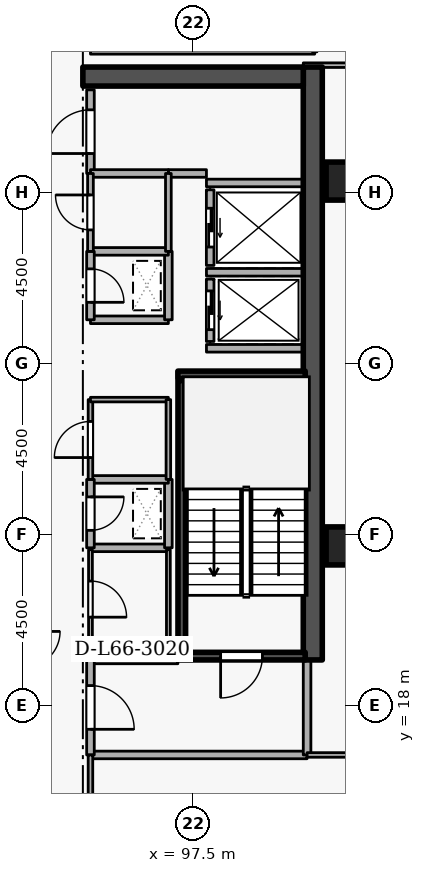
"""IFC4 building model, lengths in metres.
Left out: names, types, materials, properties, quantities, classifications, styles, units other than length and angle.
Written with IfcOpenShell. Run it as: python <this file> out.ifc"""

import sys

from ifc_helpers import new_model, si_unit, direction, frame, frame_2d, origin, origin_2d, place, context, subcontext, project, spatial, rectangle, extrude, element, fill, save


model = new_model("IFC4")
c1 = context("Model", 3, precision=1e-05, world=origin(), true_north=direction((0.0, 1.0)))
c2 = subcontext(c1, "Body", "Model", "MODEL_VIEW")
j1 = project(units=[si_unit("LENGTHUNIT", "METRE"), si_unit("PLANEANGLEUNIT", "RADIAN")], contexts=[c1])
p1 = place(None, origin())
s1 = spatial("IfcSite", under=j1, at=p1, CompositionType="ELEMENT")
p2 = place(p1, origin())
s2 = spatial("IfcBuilding", under=s1, at=p2, CompositionType="ELEMENT")
p3 = place(p2, frame((0.0, 0.0, 247.5)))
s3 = spatial("IfcBuildingStorey", under=s2, at=p3, CompositionType="ELEMENT", Elevation=247.5)
p4 = place(p3, frame((100.65, 19.2, 0.0), z_axis=(0.0, 0.0, 1.0), x_axis=(0.0, 1.0, 0.0)))
e1 = element("IfcWall", 1, at=p4, inside=s3, PredefinedType="SHEAR", context=c2, shape_type="SweptSolid", body=[
    extrude(rectangle(XDim=15.6, YDim=0.5, at=frame_2d((7.8, 0.0))), origin(), (0.0, 0.0, 1.0), 3.6),
])
p5 = place(p3, frame((94.6, 34.55, 0.0), z_axis=(0.0, 0.0, 1.0), x_axis=(1.0, 0.0, 0.0)))
e2 = element("IfcWall", 2, at=p5, inside=s3, PredefinedType="SHEAR", context=c2, shape_type="SweptSolid", body=[
    extrude(rectangle(XDim=5.8, YDim=0.5, at=frame_2d((2.9, 0.0))), origin(), (0.0, 0.0, 1.0), 3.6),
])
for number, where, z_axis, x_axis in (
    (3, (101.5, 22.2, 0.0), (0.0, 0.0, 1.0), (1.0, 0.0, 0.0)),
    (4, (101.5, 31.8, 0.0), (0.0, 0.0, 1.0), (1.0, 0.0, 0.0)),
):
    element("IfcColumn", number, at=place(p3, frame(where, z_axis=z_axis, x_axis=x_axis)), inside=s3, PredefinedType="COLUMN", context=c2, shape_type="SweptSolid", body=[
        extrude(rectangle(XDim=1.0, YDim=1.0, at=origin_2d()), origin(), (0.0, 0.0, 1.0), 3.6),
    ])
p6 = place(p3, frame((97.95, 29.22, 0.0), z_axis=(0.0, 0.0, 1.0), x_axis=(0.0, -1.0, 0.0)))
e5 = element("IfcWall", 5, at=p6, inside=s3, PredefinedType="STANDARD", context=c2, shape_type="SweptSolid", body=[
    extrude(rectangle(XDim=1.64, YDim=0.2, at=frame_2d((0.82, 0.0))), origin(), (0.0, 0.0, 1.0), 3.34),
])
p7 = place(p6, frame((0.31, 0.0, 0.0)))
e6 = element("IfcOpeningElement", 6, at=p7, cuts=e5, PredefinedType="OPENING", context=c2, shape_type="SweptSolid", body=[
    extrude(rectangle(XDim=1.02, YDim=2.06, at=frame_2d((0.51, 1.03))), frame((0.0, 0.11, 0.0), z_axis=(0.0, -1.0, 0.0), x_axis=(1.0, 0.0, 0.0)), (0.0, 0.0, 1.0), 0.22),
])
p8 = place(p3, frame((97.95, 31.57, 0.0), z_axis=(0.0, 0.0, 1.0), x_axis=(0.0, -1.0, 0.0)))
e7 = element("IfcWall", 7, at=p8, inside=s3, PredefinedType="STANDARD", context=c2, shape_type="SweptSolid", body=[
    extrude(rectangle(XDim=1.99, YDim=0.2, at=frame_2d((0.995, 0.0))), origin(), (0.0, 0.0, 1.0), 3.34),
])
p9 = place(p8, frame((0.485, 0.0, 0.0)))
e8 = element("IfcOpeningElement", 8, at=p9, cuts=e7, PredefinedType="OPENING", context=c2, shape_type="SweptSolid", body=[
    extrude(rectangle(XDim=1.02, YDim=2.06, at=frame_2d((0.51, 1.03))), frame((0.0, 0.11, 0.0), z_axis=(0.0, -1.0, 0.0), x_axis=(1.0, 0.0, 0.0)), (0.0, 0.0, 1.0), 0.22),
])
for number, where, z_axis, x_axis in (
    (9, (97.852, 29.4, 0.0), (0.0, 0.0, 1.0), (1.0, 0.0, 0.0)),
    (10, (97.852, 27.4, 0.0), (0.0, 0.0, 1.0), (1.0, 0.0, 0.0)),
    (11, (97.852, 31.75, 0.0), (0.0, 0.0, 1.0), (1.0, 0.0, 0.0)),
):
    element("IfcWall", number, at=place(p3, frame(where, z_axis=z_axis, x_axis=x_axis)), inside=s3, PredefinedType="STANDARD", context=c2, shape_type="SweptSolid", body=[
        extrude(rectangle(XDim=2.536, YDim=0.2, at=frame_2d((1.268, 0.0))), origin(), (0.0, 0.0, 1.0), 3.34),
    ])
p10 = place(p3, frame((100.45, 19.3, 0.0), z_axis=(0.0, 0.0, 1.0), x_axis=(-1.0, 0.0, 0.0)))
e12 = element("IfcWall", 12, at=p10, inside=s3, PredefinedType="SHEAR", context=c2, shape_type="SweptSolid", body=[
    extrude(rectangle(XDim=3.35, YDim=0.2, at=frame_2d((1.675, 0.0))), origin(), (0.0, 0.0, 1.0), 3.6),
])
p11 = place(p10, frame((1.125, 0.0, 0.0)))
e13 = element("IfcOpeningElement", 13, at=p11, cuts=e12, PredefinedType="OPENING", context=c2, shape_type="SweptSolid", body=[
    extrude(rectangle(XDim=1.1, YDim=2.1, at=frame_2d((0.55, 1.05))), frame((0.0, 0.11, 0.0), z_axis=(0.0, -1.0, 0.0), x_axis=(1.0, 0.0, 0.0)), (0.0, 0.0, 1.0), 0.22),
])
p12 = place(p3, frame((97.1, 26.7, 0.0), z_axis=(0.0, 0.0, 1.0), x_axis=(1.0, 0.0, 0.0)))
e14 = element("IfcWall", 14, at=p12, inside=s3, PredefinedType="SHEAR", context=c2, shape_type="SweptSolid", body=[
    extrude(rectangle(XDim=3.35, YDim=0.2, at=frame_2d((1.675, 0.0))), origin(), (0.0, 0.0, 1.0), 3.6),
])
p13 = place(p3, frame((97.203, 26.55, 0.0), z_axis=(0.0, 0.0, 1.0), x_axis=(0.0, -1.0, 0.0)))
e15 = element("IfcWall", 15, at=p13, inside=s3, PredefinedType="SHEAR", context=c2, shape_type="SweptSolid", body=[
    extrude(rectangle(XDim=7.1, YDim=0.2, at=frame_2d((3.55, 0.0))), origin(), (0.0, 0.0, 1.0), 3.6),
])
p14 = place(p3, frame((94.8, 16.7, 0.0), z_axis=(0.0, 0.0, 1.0), x_axis=(1.0, 0.0, 0.0)))
e16 = element("IfcWall", 16, at=p14, inside=s3, PredefinedType="STANDARD", context=c2, shape_type="SweptSolid", body=[
    extrude(rectangle(XDim=5.7, YDim=0.2, at=frame_2d((2.85, 0.0))), origin(), (0.0, 0.0, 1.0), 3.34),
])
p15 = place(p3, frame((100.5, 16.7, 0.0), z_axis=(0.0, 0.0, 1.0), x_axis=(0.0, 1.0, 0.0)))
e17 = element("IfcWall", 17, at=p15, inside=s3, PredefinedType="STANDARD", context=c2, shape_type="SweptSolid", body=[
    extrude(rectangle(XDim=2.5, YDim=0.2, at=frame_2d((1.25, 0.0))), origin(), (0.0, 0.0, 1.0), 3.34),
])
p16 = place(p3, frame((97.1, 19.2, 0.0), z_axis=(0.0, 0.0, 1.0), x_axis=(-1.0, 0.0, 0.0)))
e18 = element("IfcWall", 18, at=p16, inside=s3, PredefinedType="STANDARD", context=c2, shape_type="SweptSolid", body=[
    extrude(rectangle(XDim=2.3, YDim=0.2, at=frame_2d((1.15, 0.0))), origin(), (0.0, 0.0, 1.0), 2.545),
])
p17 = place(p3, frame((94.8, 19.2, 0.0), z_axis=(0.0, 0.0, 1.0), x_axis=(0.0, -1.0, 0.0)))
e19 = element("IfcWall", 19, at=p17, inside=s3, PredefinedType="STANDARD", context=c2, shape_type="SweptSolid", body=[
    extrude(rectangle(XDim=2.5, YDim=0.2, at=frame_2d((1.25, 0.0))), origin(), (0.0, 0.0, 1.0), 3.34),
])
p18 = place(p17, frame((0.675, 0.0, 0.0)))
e20 = element("IfcOpeningElement", 20, at=p18, cuts=e19, PredefinedType="OPENING", context=c2, shape_type="SweptSolid", body=[
    extrude(rectangle(XDim=1.15, YDim=2.1, at=frame_2d((0.575, 1.05))), frame((0.0, 0.11, 0.0), z_axis=(0.0, -1.0, 0.0), x_axis=(1.0, 0.0, 0.0)), (0.0, 0.0, 1.0), 0.22),
])
p19 = place(p3, frame((94.8, 28.15, 0.0), z_axis=(0.0, 0.0, 1.0), x_axis=(1.0, 0.0, 0.0)))
e21 = element("IfcWall", 21, at=p19, inside=s3, PredefinedType="STANDARD", context=c2, shape_type="SweptSolid", body=[
    extrude(rectangle(XDim=2.05, YDim=0.2, at=frame_2d((1.025, 0.0))), origin(), (0.0, 0.0, 1.0), 3.34),
])
p20 = place(p3, frame((96.85, 28.15, 0.0), z_axis=(0.0, 0.0, 1.0), x_axis=(0.0, 1.0, 0.0)))
e22 = element("IfcWall", 22, at=p20, inside=s3, PredefinedType="STANDARD", context=c2, shape_type="SweptSolid", body=[
    extrude(rectangle(XDim=1.8, YDim=0.2, at=frame_2d((0.9, 0.0))), origin(), (0.0, 0.0, 1.0), 3.34),
])
p21 = place(p3, frame((96.85, 29.95, 0.0), z_axis=(0.0, 0.0, 1.0), x_axis=(-1.0, 0.0, 0.0)))
e23 = element("IfcWall", 23, at=p21, inside=s3, PredefinedType="STANDARD", context=c2, shape_type="SweptSolid", body=[
    extrude(rectangle(XDim=2.05, YDim=0.2, at=frame_2d((1.025, 0.0))), origin(), (0.0, 0.0, 1.0), 3.34),
])
p22 = place(p3, frame((94.8, 29.95, 0.0), z_axis=(0.0, 0.0, 1.0), x_axis=(0.0, -1.0, 0.0)))
e24 = element("IfcWall", 24, at=p22, inside=s3, PredefinedType="STANDARD", context=c2, shape_type="SweptSolid", body=[
    extrude(rectangle(XDim=1.8, YDim=0.2, at=frame_2d((0.9, 0.0))), origin(), (0.0, 0.0, 1.0), 3.34),
])
p23 = place(p22, frame((0.46, 0.0, 0.0)))
e25 = element("IfcOpeningElement", 25, at=p23, cuts=e24, PredefinedType="OPENING", context=c2, shape_type="SweptSolid", body=[
    extrude(rectangle(XDim=0.88, YDim=2.04, at=frame_2d((0.44, 1.02))), frame((0.0, 0.11, 0.0), z_axis=(0.0, -1.0, 0.0), x_axis=(1.0, 0.0, 0.0)), (0.0, 0.0, 1.0), 0.22),
])
p24 = place(p3, frame((94.8, 22.15, 0.0), z_axis=(0.0, 0.0, 1.0), x_axis=(1.0, 0.0, 0.0)))
e26 = element("IfcWall", 26, at=p24, inside=s3, PredefinedType="STANDARD", context=c2, shape_type="SweptSolid", body=[
    extrude(rectangle(XDim=2.05, YDim=0.2, at=frame_2d((1.025, 0.0))), origin(), (0.0, 0.0, 1.0), 3.34),
])
p25 = place(p3, frame((96.85, 22.15, 0.0), z_axis=(0.0, 0.0, 1.0), x_axis=(0.0, 1.0, 0.0)))
e27 = element("IfcWall", 27, at=p25, inside=s3, PredefinedType="STANDARD", context=c2, shape_type="SweptSolid", body=[
    extrude(rectangle(XDim=1.8, YDim=0.2, at=frame_2d((0.9, 0.0))), origin(), (0.0, 0.0, 1.0), 3.34),
])
p26 = place(p3, frame((96.85, 23.95, 0.0), z_axis=(0.0, 0.0, 1.0), x_axis=(-1.0, 0.0, 0.0)))
e28 = element("IfcWall", 28, at=p26, inside=s3, PredefinedType="STANDARD", context=c2, shape_type="SweptSolid", body=[
    extrude(rectangle(XDim=2.05, YDim=0.2, at=frame_2d((1.025, 0.0))), origin(), (0.0, 0.0, 1.0), 3.34),
])
p27 = place(p3, frame((94.8, 23.95, 0.0), z_axis=(0.0, 0.0, 1.0), x_axis=(0.0, -1.0, 0.0)))
e29 = element("IfcWall", 29, at=p27, inside=s3, PredefinedType="STANDARD", context=c2, shape_type="SweptSolid", body=[
    extrude(rectangle(XDim=1.8, YDim=0.2, at=frame_2d((0.9, 0.0))), origin(), (0.0, 0.0, 1.0), 3.34),
])
p28 = place(p27, frame((0.46, 0.0, 0.0)))
e30 = element("IfcOpeningElement", 30, at=p28, cuts=e29, PredefinedType="OPENING", context=c2, shape_type="SweptSolid", body=[
    extrude(rectangle(XDim=0.88, YDim=2.04, at=frame_2d((0.44, 1.02))), frame((0.0, 0.11, 0.0), z_axis=(0.0, -1.0, 0.0), x_axis=(1.0, 0.0, 0.0)), (0.0, 0.0, 1.0), 0.22),
])
p29 = place(p3, frame((94.8, 32.0, 0.0), z_axis=(0.0, 0.0, 1.0), x_axis=(0.0, 1.0, 0.0)))
e31 = element("IfcWall", 31, at=p29, inside=s3, PredefinedType="STANDARD", context=c2, shape_type="SweptSolid", body=[
    extrude(rectangle(XDim=2.2, YDim=0.2, at=frame_2d((1.1, 0.0))), origin(), (0.0, 0.0, 1.0), 3.34),
])
p30 = place(p29, frame((0.525, 0.0, 0.0)))
e32 = element("IfcOpeningElement", 32, at=p30, cuts=e31, PredefinedType="OPENING", context=c2, shape_type="SweptSolid", body=[
    extrude(rectangle(XDim=1.15, YDim=2.1, at=frame_2d((0.575, 1.05))), frame((0.0, 0.11, 0.0), z_axis=(0.0, -1.0, 0.0), x_axis=(1.0, 0.0, 0.0)), (0.0, 0.0, 1.0), 0.22),
])
p31 = place(p3, frame((97.852, 32.0, 0.0), z_axis=(0.0, 0.0, 1.0), x_axis=(-1.0, 0.0, 0.0)))
e33 = element("IfcWall", 33, at=p31, inside=s3, PredefinedType="STANDARD", context=c2, shape_type="SweptSolid", body=[
    extrude(rectangle(XDim=1.002, YDim=0.2, at=frame_2d((0.501, 0.0))), origin(), (0.0, 0.0, 1.0), 3.34),
])
p32 = place(p3, frame((96.85, 32.0, 0.0), z_axis=(0.0, 0.0, 1.0), x_axis=(-1.0, 0.0, 0.0)))
e34 = element("IfcWall", 34, at=p32, inside=s3, PredefinedType="STANDARD", context=c2, shape_type="SweptSolid", body=[
    extrude(rectangle(XDim=2.05, YDim=0.2, at=frame_2d((1.025, 0.0))), origin(), (0.0, 0.0, 1.0), 3.34),
])
p33 = place(p3, frame((94.8, 19.5, 0.0), z_axis=(0.0, 0.0, 1.0), x_axis=(1.0, 0.0, 0.0)))
e35 = element("IfcWall", 35, at=p33, inside=s3, PredefinedType="PARTITIONING", context=c2, shape_type="SweptSolid", body=[
    extrude(rectangle(XDim=2.05, YDim=0.1, at=frame_2d((1.025, 0.0))), origin(), (0.0, 0.0, 1.0), 2.545),
])
p34 = place(p3, frame((96.85, 19.5, 0.0), z_axis=(0.0, 0.0, 1.0), x_axis=(0.0, 1.0, 0.0)))
e36 = element("IfcWall", 36, at=p34, inside=s3, PredefinedType="PARTITIONING", context=c2, shape_type="SweptSolid", body=[
    extrude(rectangle(XDim=2.6, YDim=0.1, at=frame_2d((1.3, 0.0))), origin(), (0.0, 0.0, 1.0), 3.34),
])
p35 = place(p3, frame((94.8, 22.1, 0.0), z_axis=(0.0, 0.0, 1.0), x_axis=(0.0, -1.0, 0.0)))
e37 = element("IfcWall", 37, at=p35, inside=s3, PredefinedType="PARTITIONING", context=c2, shape_type="SweptSolid", body=[
    extrude(rectangle(XDim=2.6, YDim=0.1, at=frame_2d((1.3, 0.0))), origin(), (0.0, 0.0, 1.0), 3.34),
])
p36 = place(p35, frame((0.825, 0.0, 0.0)))
e38 = element("IfcOpeningElement", 38, at=p36, cuts=e37, PredefinedType="OPENING", context=c2, shape_type="SweptSolid", body=[
    extrude(rectangle(XDim=0.95, YDim=2.1, at=frame_2d((0.475, 1.05))), frame((0.0, 0.06, 0.0), z_axis=(0.0, -1.0, 0.0), x_axis=(1.0, 0.0, 0.0)), (0.0, 0.0, 1.0), 0.12),
])
p37 = place(p3, frame((94.8, 23.95, 0.0), z_axis=(0.0, 0.0, 1.0), x_axis=(0.0, 1.0, 0.0)))
e39 = element("IfcWall", 39, at=p37, inside=s3, PredefinedType="PARTITIONING", context=c2, shape_type="SweptSolid", body=[
    extrude(rectangle(XDim=2.1, YDim=0.12, at=frame_2d((1.05, 0.0))), origin(), (0.0, 0.0, 1.0), 3.34),
])
p38 = place(p37, frame((0.575, 0.0, 0.0)))
e40 = element("IfcOpeningElement", 40, at=p38, cuts=e39, PredefinedType="OPENING", context=c2, shape_type="SweptSolid", body=[
    extrude(rectangle(XDim=0.95, YDim=2.1, at=frame_2d((0.475, 1.05))), frame((0.0, 0.07, 0.0), z_axis=(0.0, -1.0, 0.0), x_axis=(1.0, 0.0, 0.0)), (0.0, 0.0, 1.0), 0.14),
])
p39 = place(p3, frame((94.8, 26.05, 0.0), z_axis=(0.0, 0.0, 1.0), x_axis=(1.0, 0.0, 0.0)))
e41 = element("IfcWall", 41, at=p39, inside=s3, PredefinedType="PARTITIONING", context=c2, shape_type="SweptSolid", body=[
    extrude(rectangle(XDim=2.05, YDim=0.12, at=frame_2d((1.025, 0.0))), origin(), (0.0, 0.0, 1.0), 3.34),
])
p40 = place(p3, frame((96.85, 26.05, 0.0), z_axis=(0.0, 0.0, 1.0), x_axis=(0.0, -1.0, 0.0)))
e42 = element("IfcWall", 42, at=p40, inside=s3, PredefinedType="PARTITIONING", context=c2, shape_type="SweptSolid", body=[
    extrude(rectangle(XDim=2.1, YDim=0.12, at=frame_2d((1.05, 0.0))), origin(), (0.0, 0.0, 1.0), 3.34),
])
p41 = place(p3, frame((94.8, 29.95, 0.0), z_axis=(0.0, 0.0, 1.0), x_axis=(0.0, 1.0, 0.0)))
e43 = element("IfcWall", 43, at=p41, inside=s3, PredefinedType="PARTITIONING", context=c2, shape_type="SweptSolid", body=[
    extrude(rectangle(XDim=2.05, YDim=0.15, at=frame_2d((1.025, 0.0))), origin(), (0.0, 0.0, 1.0), 3.34),
])
p42 = place(p41, frame((0.565, 0.0, 0.0)))
e44 = element("IfcOpeningElement", 44, at=p42, cuts=e43, PredefinedType="OPENING", context=c2, shape_type="SweptSolid", body=[
    extrude(rectangle(XDim=0.92, YDim=2.08, at=frame_2d((0.46, 1.04))), frame((0.0, 0.085, 0.0), z_axis=(0.0, -1.0, 0.0), x_axis=(1.0, 0.0, 0.0)), (0.0, 0.0, 1.0), 0.17),
])
p43 = place(p3, frame((96.85, 32.0, 0.0), z_axis=(0.0, 0.0, 1.0), x_axis=(0.0, -1.0, 0.0)))
e45 = element("IfcWall", 45, at=p43, inside=s3, PredefinedType="PARTITIONING", context=c2, shape_type="SweptSolid", body=[
    extrude(rectangle(XDim=2.05, YDim=0.15, at=frame_2d((1.025, 0.0))), origin(), (0.0, 0.0, 1.0), 3.34),
])
p44 = place(p3, frame((94.8, 35.2, 0.0), z_axis=(0.0, 0.0, 1.0), x_axis=(1.0, 0.0, 0.0)))
e46 = element("IfcWall", 46, at=p44, inside=s3, PredefinedType="PARTITIONING", context=c2, shape_type="SweptSolid", body=[
    extrude(rectangle(XDim=5.9, YDim=0.12, at=frame_2d((2.95, 0.0))), origin(), (0.0, 0.0, 1.0), 3.34),
])
p45 = place(p3, frame((112.22, 34.85, 0.0), z_axis=(0.0, 0.0, 1.0), x_axis=(-1.0, 0.0, 0.0)))
e47 = element("IfcWall", 47, at=p45, inside=s3, PredefinedType="PARTITIONING", context=c2, shape_type="SweptSolid", body=[
    extrude(rectangle(XDim=11.82, YDim=0.12, at=frame_2d((5.91, 0.0))), origin(), (0.0, 0.0, 1.0), 2.545),
])
p46 = place(p3, frame((94.8, 14.75, 0.0), z_axis=(0.0, 0.0, 1.0), x_axis=(0.0, 1.0, 0.0)))
e48 = element("IfcWall", 48, at=p46, inside=s3, PredefinedType="PARTITIONING", context=c2, shape_type="SweptSolid", body=[
    extrude(rectangle(XDim=1.95, YDim=0.12, at=frame_2d((0.975, 0.0))), origin(), (0.0, 0.0, 1.0), 3.34),
])
p47 = place(p3, frame((100.5, 16.7, 0.0), z_axis=(0.0, 0.0, 1.0), x_axis=(1.0, 0.0, 0.0)))
e49 = element("IfcWall", 49, at=p47, inside=s3, PredefinedType="PARTITIONING", context=c2, shape_type="SweptSolid", body=[
    extrude(rectangle(XDim=11.72, YDim=0.12, at=frame_2d((5.86, 0.0))), origin(), (0.0, 0.0, 1.0), 3.34),
])
p48 = place(p7, origin())
e50 = element("IfcDoor", 50, at=p48, inside=s3, OperationType="SLIDING_TO_LEFT", PredefinedType="DOOR", context=c2, shape_type="SweptSolid", body=[
    extrude(rectangle(XDim=1.02, YDim=2.06, at=frame_2d((0.51, 1.03))), frame((0.0, 0.025, 0.0), z_axis=(0.0, -1.0, 0.0), x_axis=(1.0, 0.0, 0.0)), (0.0, 0.0, 1.0), 0.05),
])
fill(e6, e50)
p49 = place(p9, origin())
e51 = element("IfcDoor", 51, at=p49, inside=s3, OperationType="SLIDING_TO_LEFT", PredefinedType="DOOR", context=c2, shape_type="SweptSolid", body=[
    extrude(rectangle(XDim=1.02, YDim=2.06, at=frame_2d((0.51, 1.03))), frame((0.0, 0.025, 0.0), z_axis=(0.0, -1.0, 0.0), x_axis=(1.0, 0.0, 0.0)), (0.0, 0.0, 1.0), 0.05),
])
fill(e8, e51)
p50 = place(p11, origin())
e52 = element("IfcDoor", 52, at=p50, inside=s3, OperationType="SINGLE_SWING_RIGHT", PredefinedType="DOOR", context=c2, shape_type="SweptSolid", body=[
    extrude(rectangle(XDim=1.1, YDim=2.1, at=frame_2d((0.55, 1.05))), frame((0.0, 0.025, 0.0), z_axis=(0.0, -1.0, 0.0), x_axis=(1.0, 0.0, 0.0)), (0.0, 0.0, 1.0), 0.05),
])
fill(e13, e52)
p51 = place(p18, origin())
e53 = element("IfcDoor", 53, at=p51, inside=s3, OperationType="SINGLE_SWING_RIGHT", PredefinedType="DOOR", context=c2, shape_type="SweptSolid", body=[
    extrude(rectangle(XDim=1.15, YDim=2.1, at=frame_2d((0.575, 1.05))), frame((0.0, 0.025, 0.0), z_axis=(0.0, -1.0, 0.0), x_axis=(1.0, 0.0, 0.0)), (0.0, 0.0, 1.0), 0.05),
])
fill(e20, e53)
p52 = place(p23, origin())
e54 = element("IfcDoor", 54, at=p52, inside=s3, OperationType="SINGLE_SWING_RIGHT", PredefinedType="DOOR", context=c2, shape_type="SweptSolid", body=[
    extrude(rectangle(XDim=0.88, YDim=2.04, at=frame_2d((0.44, 1.02))), frame((0.0, 0.025, 0.0), z_axis=(0.0, -1.0, 0.0), x_axis=(1.0, 0.0, 0.0)), (0.0, 0.0, 1.0), 0.05),
])
fill(e25, e54)
p53 = place(p28, origin())
e55 = element("IfcDoor", 55, at=p53, inside=s3, OperationType="SINGLE_SWING_LEFT", PredefinedType="DOOR", context=c2, shape_type="SweptSolid", body=[
    extrude(rectangle(XDim=0.88, YDim=2.04, at=frame_2d((0.44, 1.02))), frame((0.0, 0.025, 0.0), z_axis=(0.0, -1.0, 0.0), x_axis=(1.0, 0.0, 0.0)), (0.0, 0.0, 1.0), 0.05),
])
fill(e30, e55)
p54 = place(p36, origin())
e56 = element("IfcDoor", 56, at=p54, inside=s3, OperationType="SINGLE_SWING_RIGHT", PredefinedType="DOOR", context=c2, shape_type="SweptSolid", body=[
    extrude(rectangle(XDim=0.95, YDim=2.1, at=frame_2d((0.475, 1.05))), frame((0.0, 0.025, 0.0), z_axis=(0.0, -1.0, 0.0), x_axis=(1.0, 0.0, 0.0)), (0.0, 0.0, 1.0), 0.05),
])
fill(e38, e56)
p55 = place(p38, origin())
e57 = element("IfcDoor", 57, at=p55, inside=s3, OperationType="SINGLE_SWING_LEFT", PredefinedType="DOOR", context=c2, shape_type="SweptSolid", body=[
    extrude(rectangle(XDim=0.95, YDim=2.1, at=frame_2d((0.475, 1.05))), frame((0.0, 0.025, 0.0), z_axis=(0.0, -1.0, 0.0), x_axis=(1.0, 0.0, 0.0)), (0.0, 0.0, 1.0), 0.05),
])
fill(e40, e57)
p56 = place(p42, origin())
e58 = element("IfcDoor", 58, at=p56, inside=s3, OperationType="SINGLE_SWING_RIGHT", PredefinedType="DOOR", context=c2, shape_type="SweptSolid", body=[
    extrude(rectangle(XDim=0.92, YDim=2.08, at=frame_2d((0.46, 1.04))), frame((0.0, 0.025, 0.0), z_axis=(0.0, -1.0, 0.0), x_axis=(1.0, 0.0, 0.0)), (0.0, 0.0, 1.0), 0.05),
])
fill(e44, e58)
p57 = place(p30, origin())
e59 = element("IfcDoor", 59, at=p57, inside=s3, OperationType="SINGLE_SWING_LEFT", PredefinedType="DOOR", context=c2, shape_type="SweptSolid", body=[
    extrude(rectangle(XDim=1.15, YDim=2.1, at=frame_2d((0.575, 1.05))), frame((0.0, 0.025, 0.0), z_axis=(0.0, -1.0, 0.0), x_axis=(1.0, 0.0, 0.0)), (0.0, 0.0, 1.0), 0.05),
])
fill(e32, e59)
save(model, sys.argv[1])
